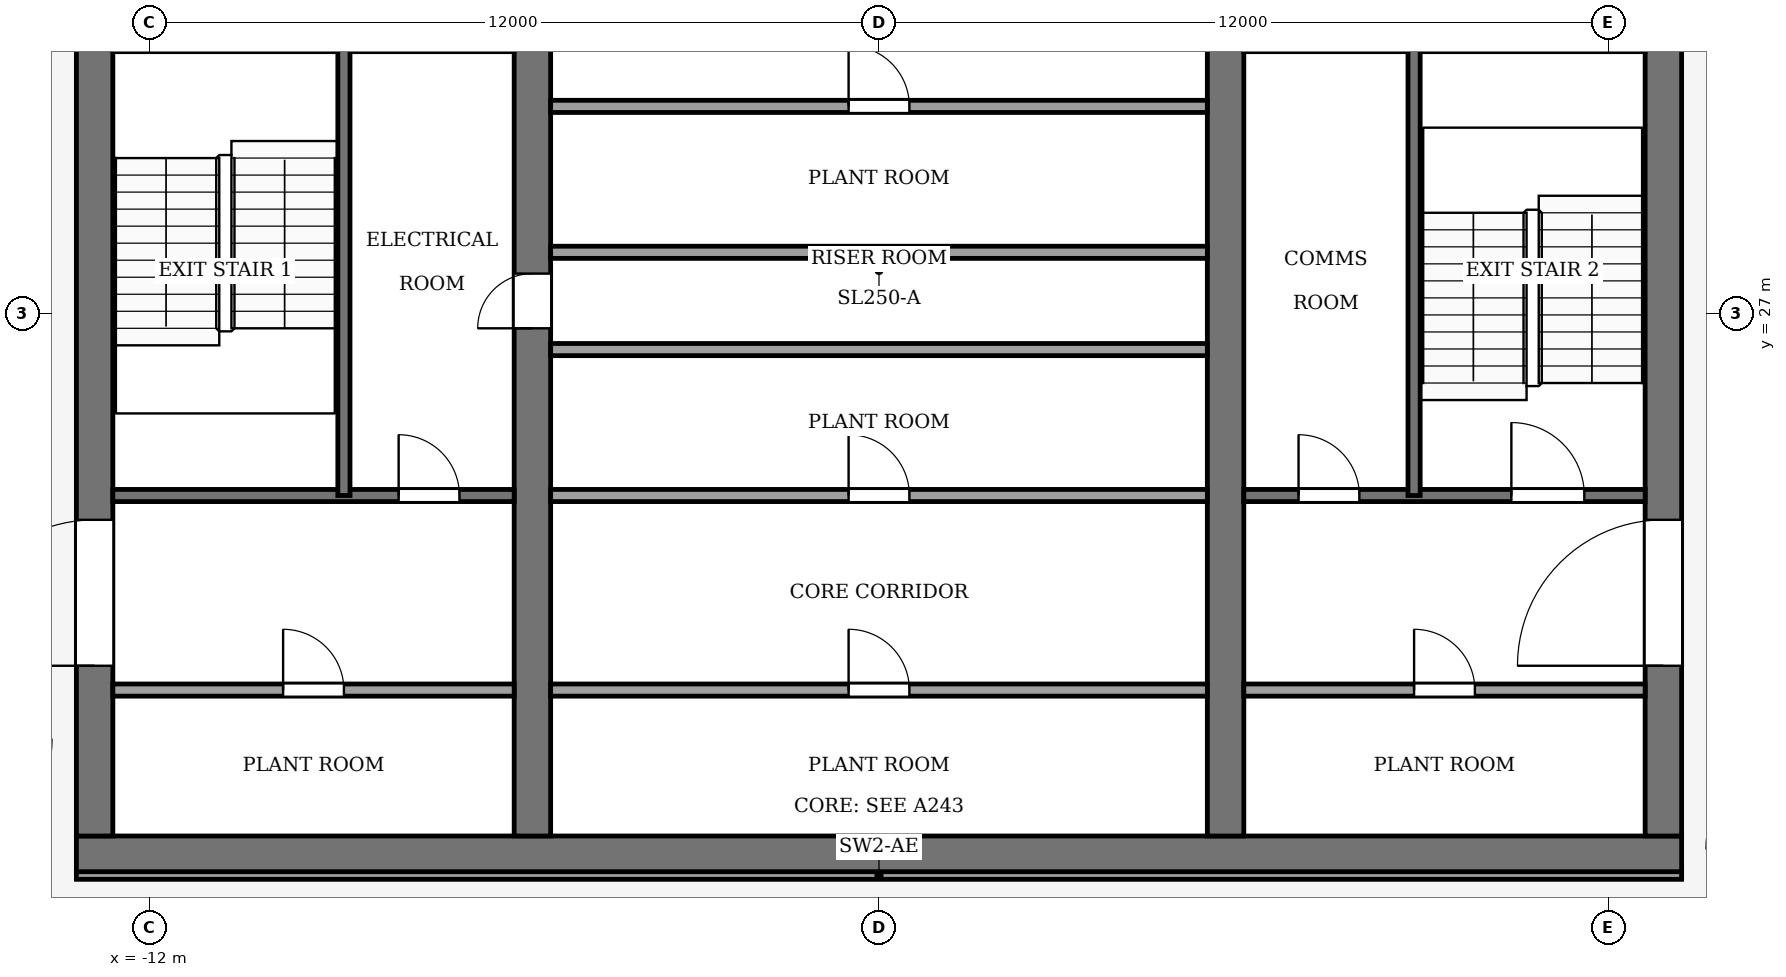
"""IFC4 building model, lengths in metres.
Left out: names, types, materials, properties, quantities, classifications, styles, units other than length and angle.
Written with IfcOpenShell. Run it as: python <this file> out.ifc"""

import sys

from ifc_helpers import new_model, si_unit, direction, frame, frame_2d, origin, place, context, subcontext, project, spatial, rectangle, extrude, element, fill, save


model = new_model("IFC4")
c1 = context("Model", 3, precision=1e-05, world=origin(), true_north=direction((0.0, 1.0)))
c2 = subcontext(c1, "Body", "Model", "MODEL_VIEW")
j1 = project(units=[si_unit("LENGTHUNIT", "METRE"), si_unit("PLANEANGLEUNIT", "RADIAN")], contexts=[c1])
p1 = place(None, origin())
s1 = spatial("IfcSite", under=j1, at=p1, CompositionType="ELEMENT")
p2 = place(p1, origin())
s2 = spatial("IfcBuilding", under=s1, at=p2, CompositionType="ELEMENT")
p3 = place(p2, frame((0.0, 0.0, 364.0)))
s3 = spatial("IfcBuildingStorey", under=s2, at=p3, CompositionType="ELEMENT", Elevation=364.0)
p4 = place(p3, frame((-13.2, 18.1, -0.15), z_axis=(0.0, 0.0, 1.0), x_axis=(1.0, 0.0, 0.0)))
e1 = element("IfcWall", 1, at=p4, inside=s3, PredefinedType="SHEAR", context=c2, shape_type="SweptSolid", body=[
    extrude(rectangle(XDim=26.4, YDim=0.6, at=frame_2d((13.2, 0.0))), origin(), (0.0, 0.0, 1.0), 4.0),
])
p5 = place(p3, frame((-12.9, 18.4, -0.15), z_axis=(0.0, 0.0, 1.0), x_axis=(0.0, 1.0, 0.0)))
e2 = element("IfcWall", 2, at=p5, inside=s3, PredefinedType="SHEAR", context=c2, shape_type="SweptSolid", body=[
    extrude(rectangle(XDim=19.2, YDim=0.6, at=frame_2d((9.6, 0.0))), origin(), (0.0, 0.0, 1.0), 4.0),
])
p6 = place(p5, frame((2.8, 0.0, 0.15)))
e3 = element("IfcOpeningElement", 3, at=p6, cuts=e2, PredefinedType="OPENING", context=c2, shape_type="SweptSolid", body=[
    extrude(rectangle(XDim=2.4, YDim=2.4, at=frame_2d((1.2, 1.2))), frame((0.0, 0.31, 0.0), z_axis=(0.0, -1.0, 0.0), x_axis=(1.0, 0.0, 0.0)), (0.0, 0.0, 1.0), 0.62),
])
p7 = place(p5, frame((13.4, 0.0, 0.15)))
e4 = element("IfcOpeningElement", 4, at=p7, cuts=e2, PredefinedType="OPENING", context=c2, shape_type="SweptSolid", body=[
    extrude(rectangle(XDim=1.4, YDim=2.2, at=frame_2d((0.7, 1.1))), frame((0.0, 0.31, 0.0), z_axis=(0.0, -1.0, 0.0), x_axis=(1.0, 0.0, 0.0)), (0.0, 0.0, 1.0), 0.62),
])
p8 = place(p3, frame((12.9, 18.4, -0.15), z_axis=(0.0, 0.0, 1.0), x_axis=(0.0, 1.0, 0.0)))
e5 = element("IfcWall", 5, at=p8, inside=s3, PredefinedType="SHEAR", context=c2, shape_type="SweptSolid", body=[
    extrude(rectangle(XDim=19.2, YDim=0.6, at=frame_2d((9.6, 0.0))), origin(), (0.0, 0.0, 1.0), 4.0),
])
p9 = place(p8, frame((2.8, 0.0, 0.15)))
e6 = element("IfcOpeningElement", 6, at=p9, cuts=e5, PredefinedType="OPENING", context=c2, shape_type="SweptSolid", body=[
    extrude(rectangle(XDim=2.4, YDim=2.4, at=frame_2d((1.2, 1.2))), frame((0.0, 0.31, 0.0), z_axis=(0.0, -1.0, 0.0), x_axis=(1.0, 0.0, 0.0)), (0.0, 0.0, 1.0), 0.62),
])
p10 = place(p8, frame((13.3, 0.0, 0.15)))
e7 = element("IfcOpeningElement", 7, at=p10, cuts=e5, PredefinedType="OPENING", context=c2, shape_type="SweptSolid", body=[
    extrude(rectangle(XDim=2.4, YDim=2.4, at=frame_2d((1.2, 1.2))), frame((0.0, 0.31, 0.0), z_axis=(0.0, -1.0, 0.0), x_axis=(1.0, 0.0, 0.0)), (0.0, 0.0, 1.0), 0.62),
])
p11 = place(p3, frame((-5.7, 18.4, -0.15), z_axis=(0.0, 0.0, 1.0), x_axis=(0.0, 1.0, 0.0)))
e8 = element("IfcWall", 8, at=p11, inside=s3, PredefinedType="SHEAR", context=c2, shape_type="SweptSolid", body=[
    extrude(rectangle(XDim=19.2, YDim=0.6, at=frame_2d((9.6, 0.0))), origin(), (0.0, 0.0, 1.0), 4.0),
])
p12 = place(p11, frame((8.35, 0.0, 0.15)))
e9 = element("IfcOpeningElement", 9, at=p12, cuts=e8, PredefinedType="OPENING", context=c2, shape_type="SweptSolid", body=[
    extrude(rectangle(XDim=0.9, YDim=2.1, at=frame_2d((0.45, 1.05))), frame((0.0, 0.31, 0.0), z_axis=(0.0, -1.0, 0.0), x_axis=(1.0, 0.0, 0.0)), (0.0, 0.0, 1.0), 0.62),
])
p13 = place(p3, frame((5.7, 18.4, -0.15), z_axis=(0.0, 0.0, 1.0), x_axis=(0.0, 1.0, 0.0)))
e10 = element("IfcWall", 10, at=p13, inside=s3, PredefinedType="SHEAR", context=c2, shape_type="SweptSolid", body=[
    extrude(rectangle(XDim=19.2, YDim=0.6, at=frame_2d((9.6, 0.0))), origin(), (0.0, 0.0, 1.0), 4.0),
])
p14 = place(p13, frame((13.3, 0.0, 0.15)))
e11 = element("IfcOpeningElement", 11, at=p14, cuts=e10, PredefinedType="OPENING", context=c2, shape_type="SweptSolid", body=[
    extrude(rectangle(XDim=2.4, YDim=2.4, at=frame_2d((1.2, 1.2))), frame((0.0, 0.31, 0.0), z_axis=(0.0, -1.0, 0.0), x_axis=(1.0, 0.0, 0.0)), (0.0, 0.0, 1.0), 0.62),
])
p15 = place(p3, frame((-12.6, 20.8, 0.0), z_axis=(0.0, 0.0, 1.0), x_axis=(1.0, 0.0, 0.0)))
e12 = element("IfcWall", 12, at=p15, inside=s3, PredefinedType="PARTITIONING", context=c2, shape_type="SweptSolid", body=[
    extrude(rectangle(XDim=6.6, YDim=0.2, at=frame_2d((3.3, 0.0))), origin(), (0.0, 0.0, 1.0), 3.85),
])
p16 = place(p15, frame((2.8, 0.0, 0.0)))
e13 = element("IfcOpeningElement", 13, at=p16, cuts=e12, PredefinedType="OPENING", context=c2, shape_type="SweptSolid", body=[
    extrude(rectangle(XDim=1.0, YDim=2.1, at=frame_2d((0.5, 1.05))), frame((0.0, 0.11, 0.0), z_axis=(0.0, -1.0, 0.0), x_axis=(1.0, 0.0, 0.0)), (0.0, 0.0, 1.0), 0.22),
])
p17 = place(p3, frame((-5.4, 20.8, 0.0), z_axis=(0.0, 0.0, 1.0), x_axis=(1.0, 0.0, 0.0)))
e14 = element("IfcWall", 14, at=p17, inside=s3, PredefinedType="PARTITIONING", context=c2, shape_type="SweptSolid", body=[
    extrude(rectangle(XDim=10.8, YDim=0.2, at=frame_2d((5.4, 0.0))), origin(), (0.0, 0.0, 1.0), 3.85),
])
p18 = place(p17, frame((4.9, 0.0, 0.0)))
e15 = element("IfcOpeningElement", 15, at=p18, cuts=e14, PredefinedType="OPENING", context=c2, shape_type="SweptSolid", body=[
    extrude(rectangle(XDim=1.0, YDim=2.1, at=frame_2d((0.5, 1.05))), frame((0.0, 0.11, 0.0), z_axis=(0.0, -1.0, 0.0), x_axis=(1.0, 0.0, 0.0)), (0.0, 0.0, 1.0), 0.22),
])
p19 = place(p3, frame((6.0, 20.8, 0.0), z_axis=(0.0, 0.0, 1.0), x_axis=(1.0, 0.0, 0.0)))
e16 = element("IfcWall", 16, at=p19, inside=s3, PredefinedType="PARTITIONING", context=c2, shape_type="SweptSolid", body=[
    extrude(rectangle(XDim=6.6, YDim=0.2, at=frame_2d((3.3, 0.0))), origin(), (0.0, 0.0, 1.0), 3.85),
])
p20 = place(p19, frame((2.8, 0.0, 0.0)))
e17 = element("IfcOpeningElement", 17, at=p20, cuts=e16, PredefinedType="OPENING", context=c2, shape_type="SweptSolid", body=[
    extrude(rectangle(XDim=1.0, YDim=2.1, at=frame_2d((0.5, 1.05))), frame((0.0, 0.11, 0.0), z_axis=(0.0, -1.0, 0.0), x_axis=(1.0, 0.0, 0.0)), (0.0, 0.0, 1.0), 0.22),
])
p21 = place(p3, frame((-12.6, 24.0, 0.0), z_axis=(0.0, 0.0, 1.0), x_axis=(1.0, 0.0, 0.0)))
e18 = element("IfcWall", 18, at=p21, inside=s3, PredefinedType="PARTITIONING", context=c2, shape_type="SweptSolid", body=[
    extrude(rectangle(XDim=6.6, YDim=0.2, at=frame_2d((3.3, 0.0))), origin(), (0.0, 0.0, 1.0), 3.85),
])
p22 = place(p21, frame((4.7, 0.0, 0.0)))
e19 = element("IfcOpeningElement", 19, at=p22, cuts=e18, PredefinedType="OPENING", context=c2, shape_type="SweptSolid", body=[
    extrude(rectangle(XDim=1.0, YDim=2.1, at=frame_2d((0.5, 1.05))), frame((0.0, 0.11, 0.0), z_axis=(0.0, -1.0, 0.0), x_axis=(1.0, 0.0, 0.0)), (0.0, 0.0, 1.0), 0.22),
])
p23 = place(p3, frame((-5.4, 24.0, 0.0), z_axis=(0.0, 0.0, 1.0), x_axis=(1.0, 0.0, 0.0)))
e20 = element("IfcWall", 20, at=p23, inside=s3, PredefinedType="PARTITIONING", context=c2, shape_type="SweptSolid", body=[
    extrude(rectangle(XDim=10.8, YDim=0.2, at=frame_2d((5.4, 0.0))), origin(), (0.0, 0.0, 1.0), 3.85),
])
p24 = place(p23, frame((4.9, 0.0, 0.0)))
e21 = element("IfcOpeningElement", 21, at=p24, cuts=e20, PredefinedType="OPENING", context=c2, shape_type="SweptSolid", body=[
    extrude(rectangle(XDim=1.0, YDim=2.1, at=frame_2d((0.5, 1.05))), frame((0.0, 0.11, 0.0), z_axis=(0.0, -1.0, 0.0), x_axis=(1.0, 0.0, 0.0)), (0.0, 0.0, 1.0), 0.22),
])
p25 = place(p3, frame((6.0, 24.0, 0.0), z_axis=(0.0, 0.0, 1.0), x_axis=(1.0, 0.0, 0.0)))
e22 = element("IfcWall", 22, at=p25, inside=s3, PredefinedType="PARTITIONING", context=c2, shape_type="SweptSolid", body=[
    extrude(rectangle(XDim=6.6, YDim=0.2, at=frame_2d((3.3, 0.0))), origin(), (0.0, 0.0, 1.0), 3.85),
])
p26 = place(p25, frame((0.9, 0.0, 0.0)))
e23 = element("IfcOpeningElement", 23, at=p26, cuts=e22, PredefinedType="OPENING", context=c2, shape_type="SweptSolid", body=[
    extrude(rectangle(XDim=1.0, YDim=2.1, at=frame_2d((0.5, 1.05))), frame((0.0, 0.11, 0.0), z_axis=(0.0, -1.0, 0.0), x_axis=(1.0, 0.0, 0.0)), (0.0, 0.0, 1.0), 0.22),
])
p27 = place(p25, frame((4.4, 0.0, 0.0)))
e24 = element("IfcOpeningElement", 24, at=p27, cuts=e22, PredefinedType="OPENING", context=c2, shape_type="SweptSolid", body=[
    extrude(rectangle(XDim=1.2, YDim=2.2, at=frame_2d((0.6, 1.1))), frame((0.0, 0.11, 0.0), z_axis=(0.0, -1.0, 0.0), x_axis=(1.0, 0.0, 0.0)), (0.0, 0.0, 1.0), 0.22),
])
for number, where, z_axis, x_axis in (
    (25, (-5.4, 26.4, 0.0), (0.0, 0.0, 1.0), (1.0, 0.0, 0.0)),
    (26, (-5.4, 28.0, 0.0), (0.0, 0.0, 1.0), (1.0, 0.0, 0.0)),
):
    element("IfcWall", number, at=place(p3, frame(where, z_axis=z_axis, x_axis=x_axis)), inside=s3, PredefinedType="PARTITIONING", context=c2, shape_type="SweptSolid", body=[
        extrude(rectangle(XDim=10.8, YDim=0.2, at=frame_2d((5.4, 0.0))), origin(), (0.0, 0.0, 1.0), 3.85),
    ])
p28 = place(p3, frame((-5.4, 30.4, 0.0), z_axis=(0.0, 0.0, 1.0), x_axis=(1.0, 0.0, 0.0)))
e27 = element("IfcWall", 27, at=p28, inside=s3, PredefinedType="PARTITIONING", context=c2, shape_type="SweptSolid", body=[
    extrude(rectangle(XDim=10.8, YDim=0.2, at=frame_2d((5.4, 0.0))), origin(), (0.0, 0.0, 1.0), 3.85),
])
p29 = place(p28, frame((4.9, 0.0, 0.0)))
e28 = element("IfcOpeningElement", 28, at=p29, cuts=e27, PredefinedType="OPENING", context=c2, shape_type="SweptSolid", body=[
    extrude(rectangle(XDim=1.0, YDim=2.1, at=frame_2d((0.5, 1.05))), frame((0.0, 0.11, 0.0), z_axis=(0.0, -1.0, 0.0), x_axis=(1.0, 0.0, 0.0)), (0.0, 0.0, 1.0), 0.22),
])
p30 = place(p3, frame((-12.6, 31.4, 0.0), z_axis=(0.0, 0.0, 1.0), x_axis=(1.0, 0.0, 0.0)))
e29 = element("IfcWall", 29, at=p30, inside=s3, PredefinedType="PARTITIONING", context=c2, shape_type="SweptSolid", body=[
    extrude(rectangle(XDim=6.6, YDim=0.2, at=frame_2d((3.3, 0.0))), origin(), (0.0, 0.0, 1.0), 3.85),
])
p31 = place(p30, frame((1.0, 0.0, 0.0)))
e30 = element("IfcOpeningElement", 30, at=p31, cuts=e29, PredefinedType="OPENING", context=c2, shape_type="SweptSolid", body=[
    extrude(rectangle(XDim=1.2, YDim=2.2, at=frame_2d((0.6, 1.1))), frame((0.0, 0.11, 0.0), z_axis=(0.0, -1.0, 0.0), x_axis=(1.0, 0.0, 0.0)), (0.0, 0.0, 1.0), 0.22),
])
p32 = place(p3, frame((6.0, 31.4, 0.0), z_axis=(0.0, 0.0, 1.0), x_axis=(1.0, 0.0, 0.0)))
e31 = element("IfcWall", 31, at=p32, inside=s3, PredefinedType="PARTITIONING", context=c2, shape_type="SweptSolid", body=[
    extrude(rectangle(XDim=6.6, YDim=0.2, at=frame_2d((3.3, 0.0))), origin(), (0.0, 0.0, 1.0), 3.85),
])
for number, where, z_axis, x_axis in (
    (32, (-8.8, 24.0, 0.0), (0.0, 0.0, 1.0), (0.0, 1.0, 0.0)),
    (33, (8.8, 24.0, 0.0), (0.0, 0.0, 1.0), (0.0, 1.0, 0.0)),
):
    element("IfcWall", number, at=place(p3, frame(where, z_axis=z_axis, x_axis=x_axis)), inside=s3, PredefinedType="PARTITIONING", context=c2, shape_type="SweptSolid", body=[
        extrude(rectangle(XDim=7.4, YDim=0.2, at=frame_2d((3.7, 0.0))), origin(), (0.0, 0.0, 1.0), 3.85),
    ])
p33 = place(p3, frame((-13.2, 17.75, 0.0), z_axis=(0.0, 0.0, 1.0), x_axis=(1.0, 0.0, 0.0)))
e34 = element("IfcWall", 34, at=p33, inside=s3, PredefinedType="PARTITIONING", context=c2, shape_type="SweptSolid", body=[
    extrude(rectangle(XDim=26.4, YDim=0.125, at=frame_2d((13.2, 0.0))), origin(), (0.0, 0.0, 1.0), 3.52),
])
p34 = place(p18, origin())
e35 = element("IfcDoor", 35, at=p34, inside=s3, OperationType="SINGLE_SWING_LEFT", PredefinedType="DOOR", context=c2, shape_type="SweptSolid", body=[
    extrude(rectangle(XDim=1.0, YDim=2.1, at=frame_2d((0.5, 1.05))), frame((0.0, 0.025, 0.0), z_axis=(0.0, -1.0, 0.0), x_axis=(1.0, 0.0, 0.0)), (0.0, 0.0, 1.0), 0.05),
])
fill(e15, e35)
p35 = place(p24, origin())
e36 = element("IfcDoor", 36, at=p35, inside=s3, OperationType="SINGLE_SWING_RIGHT", PredefinedType="DOOR", context=c2, shape_type="SweptSolid", body=[
    extrude(rectangle(XDim=1.0, YDim=2.1, at=frame_2d((0.5, 1.05))), frame((0.0, 0.025, 0.0), z_axis=(0.0, -1.0, 0.0), x_axis=(1.0, 0.0, 0.0)), (0.0, 0.0, 1.0), 0.05),
])
fill(e21, e36)
p36 = place(p29, origin())
e37 = element("IfcDoor", 37, at=p36, inside=s3, OperationType="SINGLE_SWING_LEFT", PredefinedType="DOOR", context=c2, shape_type="SweptSolid", body=[
    extrude(rectangle(XDim=1.0, YDim=2.1, at=frame_2d((0.5, 1.05))), frame((0.0, 0.025, 0.0), z_axis=(0.0, -1.0, 0.0), x_axis=(1.0, 0.0, 0.0)), (0.0, 0.0, 1.0), 0.05),
])
fill(e28, e37)
p37 = place(p16, origin())
e38 = element("IfcDoor", 38, at=p37, inside=s3, OperationType="SINGLE_SWING_RIGHT", PredefinedType="DOOR", context=c2, shape_type="SweptSolid", body=[
    extrude(rectangle(XDim=1.0, YDim=2.1, at=frame_2d((0.5, 1.05))), frame((0.0, 0.025, 0.0), z_axis=(0.0, -1.0, 0.0), x_axis=(1.0, 0.0, 0.0)), (0.0, 0.0, 1.0), 0.05),
])
fill(e13, e38)
p38 = place(p20, origin())
e39 = element("IfcDoor", 39, at=p38, inside=s3, OperationType="SINGLE_SWING_LEFT", PredefinedType="DOOR", context=c2, shape_type="SweptSolid", body=[
    extrude(rectangle(XDim=1.0, YDim=2.1, at=frame_2d((0.5, 1.05))), frame((0.0, 0.025, 0.0), z_axis=(0.0, -1.0, 0.0), x_axis=(1.0, 0.0, 0.0)), (0.0, 0.0, 1.0), 0.05),
])
fill(e17, e39)
p39 = place(p22, origin())
e40 = element("IfcDoor", 40, at=p39, inside=s3, OperationType="SINGLE_SWING_LEFT", PredefinedType="DOOR", context=c2, shape_type="SweptSolid", body=[
    extrude(rectangle(XDim=1.0, YDim=2.1, at=frame_2d((0.5, 1.05))), frame((0.0, 0.025, 0.0), z_axis=(0.0, -1.0, 0.0), x_axis=(1.0, 0.0, 0.0)), (0.0, 0.0, 1.0), 0.05),
])
fill(e19, e40)
p40 = place(p26, origin())
e41 = element("IfcDoor", 41, at=p40, inside=s3, OperationType="SINGLE_SWING_RIGHT", PredefinedType="DOOR", context=c2, shape_type="SweptSolid", body=[
    extrude(rectangle(XDim=1.0, YDim=2.1, at=frame_2d((0.5, 1.05))), frame((0.0, 0.025, 0.0), z_axis=(0.0, -1.0, 0.0), x_axis=(1.0, 0.0, 0.0)), (0.0, 0.0, 1.0), 0.05),
])
fill(e23, e41)
p41 = place(p12, origin())
e42 = element("IfcDoor", 42, at=p41, inside=s3, OperationType="SINGLE_SWING_LEFT", PredefinedType="DOOR", context=c2, shape_type="SweptSolid", body=[
    extrude(rectangle(XDim=0.9, YDim=2.1, at=frame_2d((0.45, 1.05))), frame((0.0, 0.025, 0.0), z_axis=(0.0, -1.0, 0.0), x_axis=(1.0, 0.0, 0.0)), (0.0, 0.0, 1.0), 0.05),
])
fill(e9, e42)
p42 = place(p27, origin())
e43 = element("IfcDoor", 43, at=p42, inside=s3, OperationType="SINGLE_SWING_RIGHT", PredefinedType="DOOR", context=c2, shape_type="SweptSolid", body=[
    extrude(rectangle(XDim=1.2, YDim=2.2, at=frame_2d((0.6, 1.1))), frame((0.0, 0.025, 0.0), z_axis=(0.0, -1.0, 0.0), x_axis=(1.0, 0.0, 0.0)), (0.0, 0.0, 1.0), 0.05),
])
fill(e24, e43)
p43 = place(p6, origin())
e44 = element("IfcDoor", 44, at=p43, inside=s3, OperationType="DOUBLE_DOOR_SINGLE_SWING", PredefinedType="DOOR", context=c2, shape_type="SweptSolid", body=[
    extrude(rectangle(XDim=2.4, YDim=2.4, at=frame_2d((1.2, 1.2))), frame((0.0, 0.025, 0.0), z_axis=(0.0, -1.0, 0.0), x_axis=(1.0, 0.0, 0.0)), (0.0, 0.0, 1.0), 0.05),
])
fill(e3, e44)
p44 = place(p9, origin())
e45 = element("IfcDoor", 45, at=p44, inside=s3, OperationType="DOUBLE_DOOR_SINGLE_SWING", PredefinedType="DOOR", context=c2, shape_type="SweptSolid", body=[
    extrude(rectangle(XDim=2.4, YDim=2.4, at=frame_2d((1.2, 1.2))), frame((0.0, 0.025, 0.0), z_axis=(0.0, -1.0, 0.0), x_axis=(1.0, 0.0, 0.0)), (0.0, 0.0, 1.0), 0.05),
])
fill(e6, e45)
save(model, sys.argv[1])
